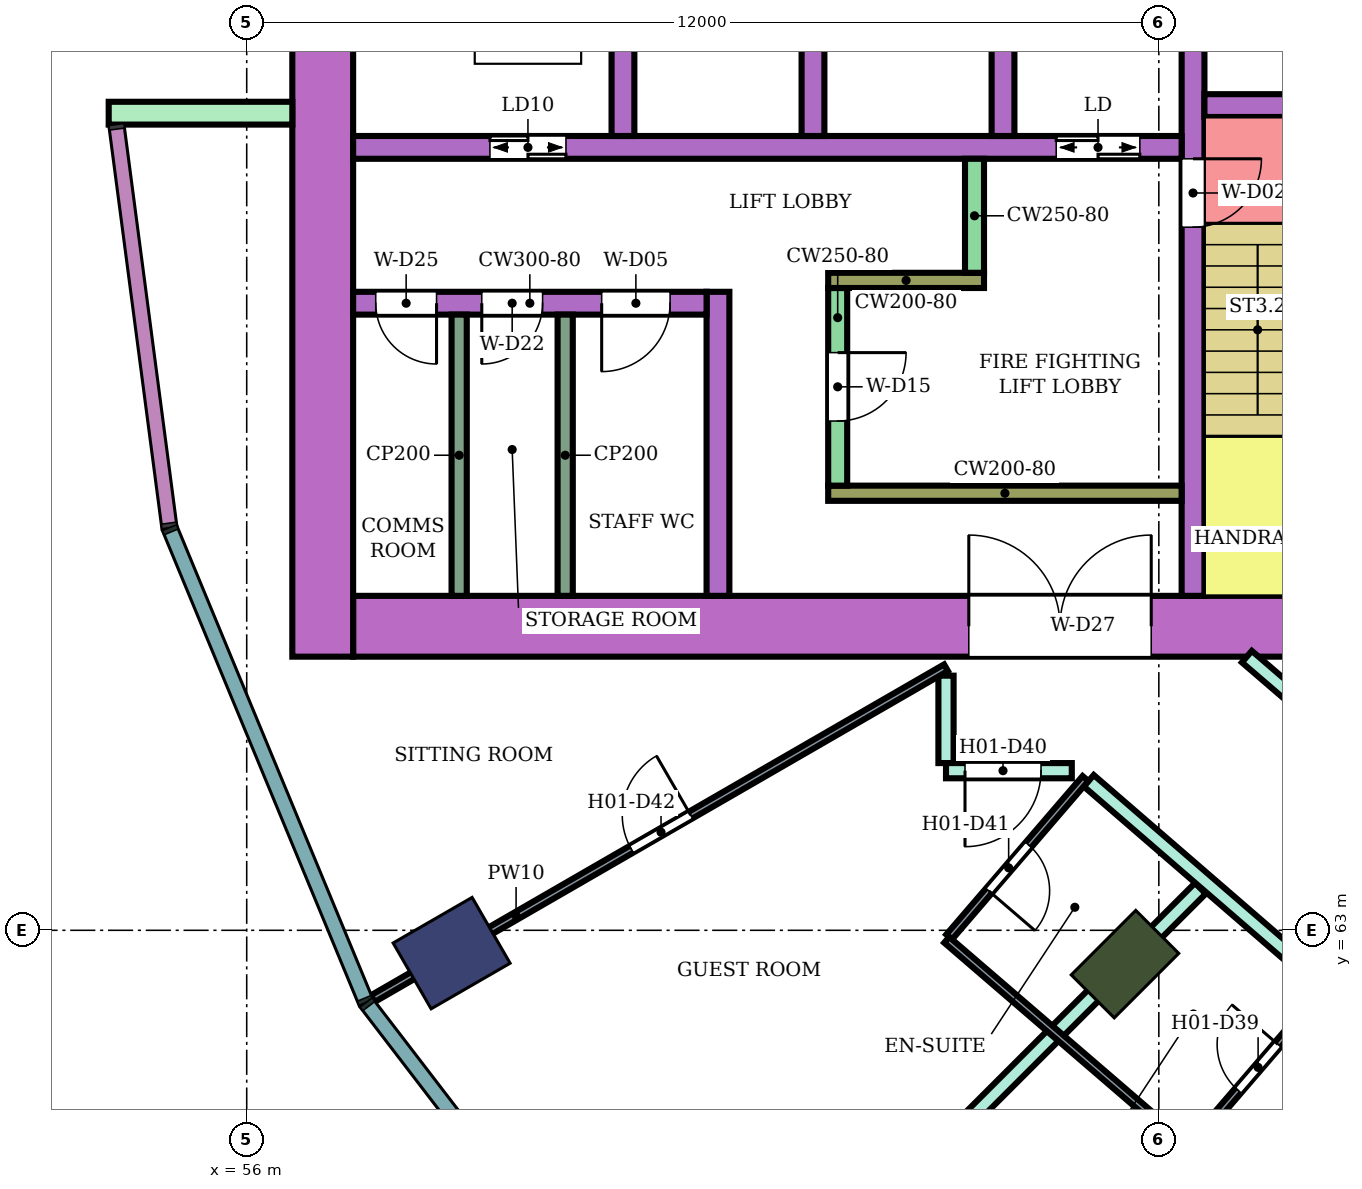
"""IFC4 building model, lengths in metres.
Left out: names, types, materials, properties, quantities, classifications, styles, units other than length and angle.
Written with IfcOpenShell. Run it as: python <this file> out.ifc"""

import sys

from ifc_helpers import new_model, si_unit, direction, frame, frame_2d, origin, origin_2d, place, context, subcontext, project, spatial, rectangle, extrude, element, fill, save


model = new_model("IFC4")
c1 = context("Model", 3, precision=1e-05, world=origin(), true_north=direction((0.0, 1.0)))
c2 = subcontext(c1, "Body", "Model", "MODEL_VIEW")
j1 = project(units=[si_unit("LENGTHUNIT", "METRE"), si_unit("PLANEANGLEUNIT", "RADIAN")], contexts=[c1])
p1 = place(None, origin())
s1 = spatial("IfcSite", under=j1, at=p1, CompositionType="ELEMENT")
p2 = place(p1, origin())
s2 = spatial("IfcBuilding", under=s1, at=p2, CompositionType="ELEMENT")
p3 = place(p2, frame((0.0, 0.0, 32.6)))
s3 = spatial("IfcBuildingStorey", under=s2, at=p3, CompositionType="ELEMENT", Elevation=32.6)
p4 = place(p3, frame((58.696, 62.7, 0.0), z_axis=(0.0, 0.0, 1.0), x_axis=(-0.866025403784, -0.5, 0.0)))
e1 = element("IfcColumn", 1, at=p4, inside=s3, PredefinedType="COLUMN", context=c2, shape_type="SweptSolid", body=[
    extrude(rectangle(XDim=1.2, YDim=1.0, at=origin_2d()), origin(), (0.0, 0.0, 1.0), 3.8),
])
p5 = place(p3, frame((67.555, 62.555, 0.0), z_axis=(0.0, 0.0, 1.0), x_axis=(-0.707106781187, -0.707106781187, 0.0)))
e2 = element("IfcColumn", 2, at=p5, inside=s3, PredefinedType="COLUMN", context=c2, shape_type="SweptSolid", body=[
    extrude(rectangle(XDim=1.2, YDim=0.8, at=origin_2d()), origin(), (0.0, 0.0, 1.0), 3.8),
])
p6 = place(p3, frame((72.1, 67.0, 0.0), z_axis=(0.0, 0.0, 1.0), x_axis=(-1.0, 0.0, 0.0)))
e3 = element("IfcWall", 3, at=p6, inside=s3, PredefinedType="SHEAR", context=c2, shape_type="SweptSolid", body=[
    extrude(rectangle(XDim=14.7, YDim=0.8, at=frame_2d((7.35, 0.0))), origin(), (0.0, 0.0, 1.0), 3.48),
])
p7 = place(p6, frame((4.2, 0.0, 0.0)))
e4 = element("IfcOpeningElement", 4, at=p7, cuts=e3, PredefinedType="OPENING", context=c2, shape_type="SweptSolid", body=[
    extrude(rectangle(XDim=2.4, YDim=2.4, at=frame_2d((1.2, 1.2))), frame((0.0, 0.41, 0.0), z_axis=(0.0, -1.0, 0.0), x_axis=(1.0, 0.0, 0.0)), (0.0, 0.0, 1.0), 0.82),
])
p8 = place(p3, frame((57.0, 83.4, 0.0), z_axis=(0.0, 0.0, 1.0), x_axis=(0.0, -1.0, 0.0)))
e5 = element("IfcWall", 5, at=p8, inside=s3, PredefinedType="SHEAR", context=c2, shape_type="SweptSolid", body=[
    extrude(rectangle(XDim=16.8, YDim=0.8, at=frame_2d((8.4, 0.0))), origin(), (0.0, 0.0, 1.0), 3.48),
])
p9 = place(p3, frame((68.45, 75.0, 0.0), z_axis=(0.0, 0.0, 1.0), x_axis=(0.0, -1.0, 0.0)))
e6 = element("IfcWall", 6, at=p9, inside=s3, PredefinedType="SHEAR", context=c2, shape_type="SweptSolid", body=[
    extrude(rectangle(XDim=7.6, YDim=0.3, at=frame_2d((3.8, 0.0))), origin(), (0.0, 0.0, 1.0), 3.48),
])
p10 = place(p9, frame((1.85, 0.0, 0.0)))
e7 = element("IfcOpeningElement", 7, at=p10, cuts=e6, PredefinedType="OPENING", context=c2, shape_type="SweptSolid", body=[
    extrude(rectangle(XDim=0.9, YDim=2.1, at=frame_2d((0.45, 1.05))), frame((0.0, 0.16, 0.0), z_axis=(0.0, -1.0, 0.0), x_axis=(1.0, 0.0, 0.0)), (0.0, 0.0, 1.0), 0.32),
])
p11 = place(p3, frame((71.65, 73.85, 0.0), z_axis=(0.0, 0.0, 1.0), x_axis=(-1.0, 0.0, 0.0)))
e8 = element("IfcWall", 8, at=p11, inside=s3, PredefinedType="SHEAR", context=c2, shape_type="SweptSolid", body=[
    extrude(rectangle(XDim=3.05, YDim=0.3, at=frame_2d((1.525, 0.0))), origin(), (0.0, 0.0, 1.0), 3.48),
])
p12 = place(p11, frame((1.1, 0.0, 0.0)))
e9 = element("IfcOpeningElement", 9, at=p12, cuts=e8, PredefinedType="OPENING", context=c2, shape_type="SweptSolid", body=[
    extrude(rectangle(XDim=0.7, YDim=2.0, at=frame_2d((0.35, 1.0))), frame((0.0, 0.16, 0.0), z_axis=(0.0, -1.0, 0.0), x_axis=(1.0, 0.0, 0.0)), (0.0, 0.0, 1.0), 0.32),
])
p13 = place(p3, frame((68.3, 73.3, 0.0), z_axis=(0.0, 0.0, 1.0), x_axis=(-1.0, 0.0, 0.0)))
e10 = element("IfcWall", 10, at=p13, inside=s3, PredefinedType="SHEAR", context=c2, shape_type="SweptSolid", body=[
    extrude(rectangle(XDim=10.9, YDim=0.3, at=frame_2d((5.45, 0.0))), origin(), (0.0, 0.0, 1.0), 3.48),
])
p14 = place(p13, frame((0.55, 0.0, 0.0)))
e11 = element("IfcOpeningElement", 11, at=p14, cuts=e10, PredefinedType="OPENING", context=c2, shape_type="SweptSolid", body=[
    extrude(rectangle(XDim=1.1, YDim=2.1, at=frame_2d((0.55, 1.05))), frame((0.0, 0.16, 0.0), z_axis=(0.0, -1.0, 0.0), x_axis=(1.0, 0.0, 0.0)), (0.0, 0.0, 1.0), 0.32),
])
p15 = place(p13, frame((8.1, 0.0, 0.0)))
e12 = element("IfcOpeningElement", 12, at=p15, cuts=e10, PredefinedType="OPENING", context=c2, shape_type="SweptSolid", body=[
    extrude(rectangle(XDim=1.0, YDim=2.1, at=frame_2d((0.5, 1.05))), frame((0.0, 0.16, 0.0), z_axis=(0.0, -1.0, 0.0), x_axis=(1.0, 0.0, 0.0)), (0.0, 0.0, 1.0), 0.32),
])
for number, where, z_axis, x_axis in (
    (13, (65.95, 76.0, 0.0), (0.0, 0.0, 1.0), (0.0, -1.0, 0.0)),
    (14, (63.45, 76.0, 0.0), (0.0, 0.0, 1.0), (0.0, -1.0, 0.0)),
    (15, (60.95, 76.0, 0.0), (0.0, 0.0, 1.0), (0.0, -1.0, 0.0)),
):
    element("IfcWall", number, at=place(p3, frame(where, z_axis=z_axis, x_axis=x_axis)), inside=s3, PredefinedType="SHEAR", context=c2, shape_type="SweptSolid", body=[
        extrude(rectangle(XDim=2.55, YDim=0.3, at=frame_2d((1.275, 0.0))), origin(), (0.0, 0.0, 1.0), 3.48),
    ])
p16 = place(p3, frame((68.3, 68.75, 0.0), z_axis=(0.0, 0.0, 1.0), x_axis=(-1.0, 0.0, 0.0)))
e16 = element("IfcWall", 16, at=p16, inside=s3, PredefinedType="SHEAR", context=c2, shape_type="SweptSolid", body=[
    extrude(rectangle(XDim=4.65, YDim=0.2, at=frame_2d((2.325, 0.0))), origin(), (0.0, 0.0, 1.0), 3.48),
])
p17 = place(p3, frame((63.775, 71.45, 0.0), z_axis=(0.0, 0.0, 1.0), x_axis=(0.0, -1.0, 0.0)))
e17 = element("IfcWall", 17, at=p17, inside=s3, PredefinedType="SHEAR", context=c2, shape_type="SweptSolid", body=[
    extrude(rectangle(XDim=2.6, YDim=0.25, at=frame_2d((1.3, 0.0))), origin(), (0.0, 0.0, 1.0), 3.48),
])
p18 = place(p17, frame((0.85, 0.0, 0.0)))
e18 = element("IfcOpeningElement", 18, at=p18, cuts=e17, PredefinedType="OPENING", context=c2, shape_type="SweptSolid", body=[
    extrude(rectangle(XDim=0.9, YDim=2.1, at=frame_2d((0.45, 1.05))), frame((0.0, 0.135, 0.0), z_axis=(0.0, -1.0, 0.0), x_axis=(1.0, 0.0, 0.0)), (0.0, 0.0, 1.0), 0.27),
])
p19 = place(p3, frame((65.7, 71.55, 0.0), z_axis=(0.0, 0.0, 1.0), x_axis=(-1.0, 0.0, 0.0)))
e19 = element("IfcWall", 19, at=p19, inside=s3, PredefinedType="SHEAR", context=c2, shape_type="SweptSolid", body=[
    extrude(rectangle(XDim=2.05, YDim=0.2, at=frame_2d((1.025, 0.0))), origin(), (0.0, 0.0, 1.0), 3.48),
])
p20 = place(p3, frame((65.575, 73.15, 0.0), z_axis=(0.0, 0.0, 1.0), x_axis=(0.0, -1.0, 0.0)))
e20 = element("IfcWall", 20, at=p20, inside=s3, PredefinedType="SHEAR", context=c2, shape_type="SweptSolid", body=[
    extrude(rectangle(XDim=1.5, YDim=0.25, at=frame_2d((0.75, 0.0))), origin(), (0.0, 0.0, 1.0), 3.48),
])
p21 = place(p3, frame((62.2, 71.4, 0.0), z_axis=(0.0, 0.0, 1.0), x_axis=(0.0, -1.0, 0.0)))
e21 = element("IfcWall", 21, at=p21, inside=s3, PredefinedType="SHEAR", context=c2, shape_type="SweptSolid", body=[
    extrude(rectangle(XDim=4.0, YDim=0.3, at=frame_2d((2.0, 0.0))), origin(), (0.0, 0.0, 1.0), 3.48),
])
p22 = place(p3, frame((62.05, 71.25, 0.0), z_axis=(0.0, 0.0, 1.0), x_axis=(-1.0, 0.0, 0.0)))
e22 = element("IfcWall", 22, at=p22, inside=s3, PredefinedType="SHEAR", context=c2, shape_type="SweptSolid", body=[
    extrude(rectangle(XDim=4.65, YDim=0.3, at=frame_2d((2.325, 0.0))), origin(), (0.0, 0.0, 1.0), 3.48),
])
p23 = place(p22, frame((0.48, 0.0, 0.0)))
e23 = element("IfcOpeningElement", 23, at=p23, cuts=e22, PredefinedType="OPENING", context=c2, shape_type="SweptSolid", body=[
    extrude(rectangle(XDim=0.9, YDim=2.1, at=frame_2d((0.45, 1.05))), frame((0.0, 0.16, 0.0), z_axis=(0.0, -1.0, 0.0), x_axis=(1.0, 0.0, 0.0)), (0.0, 0.0, 1.0), 0.32),
])
p24 = place(p22, frame((2.157, 0.0, 0.0)))
e24 = element("IfcOpeningElement", 24, at=p24, cuts=e22, PredefinedType="OPENING", context=c2, shape_type="SweptSolid", body=[
    extrude(rectangle(XDim=0.8, YDim=2.1, at=frame_2d((0.4, 1.05))), frame((0.0, 0.16, 0.0), z_axis=(0.0, -1.0, 0.0), x_axis=(1.0, 0.0, 0.0)), (0.0, 0.0, 1.0), 0.32),
])
p25 = place(p22, frame((3.552, 0.0, 0.0)))
e25 = element("IfcOpeningElement", 25, at=p25, cuts=e22, PredefinedType="OPENING", context=c2, shape_type="SweptSolid", body=[
    extrude(rectangle(XDim=0.8, YDim=2.1, at=frame_2d((0.4, 1.05))), frame((0.0, 0.16, 0.0), z_axis=(0.0, -1.0, 0.0), x_axis=(1.0, 0.0, 0.0)), (0.0, 0.0, 1.0), 0.32),
])
p26 = place(p3, frame((56.6, 73.75, 0.0), z_axis=(0.0, 0.0, 1.0), x_axis=(-1.0, 0.0, 0.0)))
e26 = element("IfcWall", 26, at=p26, inside=s3, PredefinedType="NOTDEFINED", context=c2, shape_type="SweptSolid", body=[
    extrude(rectangle(XDim=2.416, YDim=0.3, at=frame_2d((1.208, 0.0))), origin(), (0.0, 0.0, 1.0), 3.8),
])
p27 = place(p3, frame((63.592, 58.599, 0.0), z_axis=(0.0, 0.0, 1.0), x_axis=(0.707228748718, 0.706984792613, 0.0)))
e27 = element("IfcWall", 27, at=p27, inside=s3, PredefinedType="PARTITIONING", context=c2, shape_type="SweptSolid", body=[
    extrude(rectangle(XDim=7.005, YDim=0.2, at=frame_2d((3.503, 0.0))), origin(), (0.0, 0.0, 1.0), 3.35),
])
p28 = place(p3, frame((65.2, 65.2, 0.0), z_axis=(0.0, 0.0, 1.0), x_axis=(0.0, 1.0, 0.0)))
e28 = element("IfcWall", 28, at=p28, inside=s3, PredefinedType="PARTITIONING", context=c2, shape_type="SweptSolid", body=[
    extrude(rectangle(XDim=1.15, YDim=0.2, at=frame_2d((0.575, 0.0))), origin(), (0.0, 0.0, 1.0), 3.35),
])
p29 = place(p3, frame((65.2, 65.1, 0.0), z_axis=(0.0, 0.0, 1.0), x_axis=(1.0, 0.0, 0.0)))
e29 = element("IfcWall", 29, at=p29, inside=s3, PredefinedType="PARTITIONING", context=c2, shape_type="SweptSolid", body=[
    extrude(rectangle(XDim=1.655, YDim=0.2, at=frame_2d((0.828, 0.0))), origin(), (0.0, 0.0, 1.0), 3.35),
])
p30 = place(p29, frame((0.25, 0.0, 0.0)))
e30 = element("IfcOpeningElement", 30, at=p30, cuts=e29, PredefinedType="OPENING", context=c2, shape_type="SweptSolid", body=[
    extrude(rectangle(XDim=1.0, YDim=2.1, at=frame_2d((0.5, 1.05))), frame((0.0, 0.11, 0.0), z_axis=(0.0, -1.0, 0.0), x_axis=(1.0, 0.0, 0.0)), (0.0, 0.0, 1.0), 0.22),
])
p31 = place(p3, frame((67.078, 64.968, 0.0), z_axis=(0.0, 0.0, 1.0), x_axis=(0.756371089567, -0.654142778656, 0.0)))
e31 = element("IfcWall", 31, at=p31, inside=s3, PredefinedType="PARTITIONING", context=c2, shape_type="SweptSolid", body=[
    extrude(rectangle(XDim=6.185, YDim=0.2, at=frame_2d((3.093, 0.0))), origin(), (0.0, 0.0, 1.0), 3.35),
])
p32 = place(p31, frame((4.755, 0.0, 0.0)))
e32 = element("IfcOpeningElement", 32, at=p32, cuts=e31, PredefinedType="OPENING", context=c2, shape_type="SweptSolid", body=[
    extrude(rectangle(XDim=1.0, YDim=2.1, at=frame_2d((0.5, 1.05))), frame((0.0, 0.11, 0.0), z_axis=(0.0, -1.0, 0.0), x_axis=(1.0, 0.0, 0.0)), (0.0, 0.0, 1.0), 0.22),
])
p33 = place(p3, frame((67.096, 52.662, 0.0), z_axis=(0.0, 0.0, 1.0), x_axis=(0.500242450002, 0.865885379953, 0.0)))
e33 = element("IfcWall", 33, at=p33, inside=s3, PredefinedType="PARTITIONING", context=c2, shape_type="SweptSolid", body=[
    extrude(rectangle(XDim=9.374, YDim=0.2, at=frame_2d((4.687, 0.0))), origin(), (0.0, 0.0, 1.0), 3.35),
])
p34 = place(p3, frame((69.158, 66.6, 0.0), z_axis=(0.0, 0.0, 1.0), x_axis=(0.757976058094, -0.652282373943, 0.0)))
e34 = element("IfcWall", 34, at=p34, inside=s3, PredefinedType="PARTITIONING", context=c2, shape_type="SweptSolid", body=[
    extrude(rectangle(XDim=5.16, YDim=0.2, at=frame_2d((2.58, 0.0))), origin(), (0.0, 0.0, 1.0), 3.35),
])
p35 = place(p34, frame((1.6, 0.0, 0.0)))
e35 = element("IfcOpeningElement", 35, at=p35, cuts=e34, PredefinedType="OPENING", context=c2, shape_type="SweptSolid", body=[
    extrude(rectangle(XDim=1.0, YDim=2.1, at=frame_2d((0.5, 1.05))), frame((0.0, 0.11, 0.0), z_axis=(0.0, -1.0, 0.0), x_axis=(1.0, 0.0, 0.0)), (0.0, 0.0, 1.0), 0.22),
])
p36 = place(p3, frame((57.659, 62.101, 0.0), z_axis=(0.0, 0.0, 1.0), x_axis=(0.86602264145, 0.500004784474, 0.0)))
e36 = element("IfcWall", 36, at=p36, inside=s3, PredefinedType="PARTITIONING", context=c2, shape_type="SweptSolid", body=[
    extrude(rectangle(XDim=8.708, YDim=0.1, at=frame_2d((4.354, 0.0))), origin(), (0.0, 0.0, 1.0), 3.35),
])
p37 = place(p36, frame((3.929, 0.0, 0.0)))
e37 = element("IfcOpeningElement", 37, at=p37, cuts=e36, PredefinedType="OPENING", context=c2, shape_type="SweptSolid", body=[
    extrude(rectangle(XDim=0.9, YDim=2.1, at=frame_2d((0.45, 1.05))), frame((0.0, 0.06, 0.0), z_axis=(0.0, -1.0, 0.0), x_axis=(1.0, 0.0, 0.0)), (0.0, 0.0, 1.0), 0.12),
])
p38 = place(p3, frame((65.242, 62.912, 0.0), z_axis=(0.0, 0.0, 1.0), x_axis=(0.652069888227, 0.758158862553, 0.0)))
e38 = element("IfcWall", 38, at=p38, inside=s3, PredefinedType="PARTITIONING", context=c2, shape_type="SweptSolid", body=[
    extrude(rectangle(XDim=2.75, YDim=0.1, at=frame_2d((1.375, 0.0))), origin(), (0.0, 0.0, 1.0), 3.35),
])
p39 = place(p38, frame((0.8, 0.0, 0.0)))
e39 = element("IfcOpeningElement", 39, at=p39, cuts=e38, PredefinedType="OPENING", context=c2, shape_type="SweptSolid", body=[
    extrude(rectangle(XDim=0.8, YDim=2.1, at=frame_2d((0.4, 1.05))), frame((0.0, 0.06, 0.0), z_axis=(0.0, -1.0, 0.0), x_axis=(1.0, 0.0, 0.0)), (0.0, 0.0, 1.0), 0.12),
])
p40 = place(p3, frame((65.209, 62.875, 0.0), z_axis=(0.0, 0.0, 1.0), x_axis=(0.757930378138, -0.652335451969, 0.0)))
e40 = element("IfcWall", 40, at=p40, inside=s3, PredefinedType="PARTITIONING", context=c2, shape_type="SweptSolid", body=[
    extrude(rectangle(XDim=4.15, YDim=0.1, at=frame_2d((2.075, 0.0))), origin(), (0.0, 0.0, 1.0), 3.35),
])
p41 = place(p3, frame((68.393, 60.135, 0.0), z_axis=(0.0, 0.0, 1.0), x_axis=(0.652061182569, 0.758166349944, 0.0)))
e41 = element("IfcWall", 41, at=p41, inside=s3, PredefinedType="PARTITIONING", context=c2, shape_type="SweptSolid", body=[
    extrude(rectangle(XDim=2.69, YDim=0.1, at=frame_2d((1.345, 0.0))), origin(), (0.0, 0.0, 1.0), 3.35),
])
p42 = place(p41, frame((1.0, 0.0, 0.0)))
e42 = element("IfcOpeningElement", 42, at=p42, cuts=e41, PredefinedType="OPENING", context=c2, shape_type="SweptSolid", body=[
    extrude(rectangle(XDim=0.8, YDim=2.1, at=frame_2d((0.4, 1.05))), frame((0.0, 0.06, 0.0), z_axis=(0.0, -1.0, 0.0), x_axis=(1.0, 0.0, 0.0)), (0.0, 0.0, 1.0), 0.12),
])
for number, where, z_axis, x_axis in (
    (43, (60.19, 71.1, 0.0), (0.0, 0.0, 1.0), (0.0, -1.0, 0.0)),
    (44, (58.795, 71.1, 0.0), (0.0, 0.0, 1.0), (0.0, -1.0, 0.0)),
):
    element("IfcWall", number, at=place(p3, frame(where, z_axis=z_axis, x_axis=x_axis)), inside=s3, PredefinedType="PARTITIONING", context=c2, shape_type="SweptSolid", body=[
        extrude(rectangle(XDim=3.7, YDim=0.2, at=frame_2d((1.85, 0.0))), origin(), (0.0, 0.0, 1.0), 3.48),
    ])
p43 = place(p42, origin())
e45 = element("IfcDoor", 45, at=p43, inside=s3, OperationType="SINGLE_SWING_RIGHT", PredefinedType="DOOR", context=c2, shape_type="SweptSolid", body=[
    extrude(rectangle(XDim=0.8, YDim=2.1, at=frame_2d((0.4, 1.05))), frame((0.0, 0.025, 0.0), z_axis=(0.0, -1.0, 0.0), x_axis=(1.0, 0.0, 0.0)), (0.0, 0.0, 1.0), 0.05),
])
fill(e42, e45)
p44 = place(p30, frame((1.0, 0.0, 0.0), z_axis=(0.0, 0.0, 1.0), x_axis=(-1.0, 0.0, 0.0)))
e46 = element("IfcDoor", 46, at=p44, inside=s3, OperationType="SINGLE_SWING_RIGHT", PredefinedType="DOOR", context=c2, shape_type="SweptSolid", body=[
    extrude(rectangle(XDim=1.0, YDim=2.1, at=frame_2d((0.5, 1.05))), frame((0.0, 0.025, 0.0), z_axis=(0.0, -1.0, 0.0), x_axis=(1.0, 0.0, 0.0)), (0.0, 0.0, 1.0), 0.05),
])
fill(e30, e46)
p45 = place(p39, frame((0.8, 0.0, 0.0), z_axis=(0.0, 0.0, 1.0), x_axis=(-1.0, 0.0, 0.0)))
e47 = element("IfcDoor", 47, at=p45, inside=s3, OperationType="SINGLE_SWING_RIGHT", PredefinedType="DOOR", context=c2, shape_type="SweptSolid", body=[
    extrude(rectangle(XDim=0.8, YDim=2.1, at=frame_2d((0.4, 1.05))), frame((0.0, 0.025, 0.0), z_axis=(0.0, -1.0, 0.0), x_axis=(1.0, 0.0, 0.0)), (0.0, 0.0, 1.0), 0.05),
])
fill(e39, e47)
p46 = place(p37, origin())
e48 = element("IfcDoor", 48, at=p46, inside=s3, OperationType="SINGLE_SWING_RIGHT", PredefinedType="DOOR", context=c2, shape_type="SweptSolid", body=[
    extrude(rectangle(XDim=0.9, YDim=2.1, at=frame_2d((0.45, 1.05))), frame((0.0, 0.025, 0.0), z_axis=(0.0, -1.0, 0.0), x_axis=(1.0, 0.0, 0.0)), (0.0, 0.0, 1.0), 0.05),
])
fill(e37, e48)
p47 = place(p10, origin())
e49 = element("IfcDoor", 49, at=p47, inside=s3, OperationType="SINGLE_SWING_LEFT", PredefinedType="DOOR", context=c2, shape_type="SweptSolid", body=[
    extrude(rectangle(XDim=0.9, YDim=2.1, at=frame_2d((0.45, 1.05))), frame((0.0, 0.025, 0.0), z_axis=(0.0, -1.0, 0.0), x_axis=(1.0, 0.0, 0.0)), (0.0, 0.0, 1.0), 0.05),
])
fill(e7, e49)
p48 = place(p14, origin())
e50 = element("IfcDoor", 50, at=p48, inside=s3, OperationType="DOUBLE_DOOR_SLIDING", PredefinedType="DOOR", context=c2, shape_type="SweptSolid", body=[
    extrude(rectangle(XDim=1.1, YDim=2.1, at=frame_2d((0.55, 1.05))), frame((0.0, 0.025, 0.0), z_axis=(0.0, -1.0, 0.0), x_axis=(1.0, 0.0, 0.0)), (0.0, 0.0, 1.0), 0.05),
])
fill(e11, e50)
p49 = place(p15, origin())
e51 = element("IfcDoor", 51, at=p49, inside=s3, OperationType="DOUBLE_DOOR_SLIDING", PredefinedType="DOOR", context=c2, shape_type="SweptSolid", body=[
    extrude(rectangle(XDim=1.0, YDim=2.1, at=frame_2d((0.5, 1.05))), frame((0.0, 0.025, 0.0), z_axis=(0.0, -1.0, 0.0), x_axis=(1.0, 0.0, 0.0)), (0.0, 0.0, 1.0), 0.05),
])
fill(e12, e51)
p50 = place(p18, origin())
e52 = element("IfcDoor", 52, at=p50, inside=s3, OperationType="SINGLE_SWING_LEFT", PredefinedType="DOOR", context=c2, shape_type="SweptSolid", body=[
    extrude(rectangle(XDim=0.9, YDim=2.1, at=frame_2d((0.45, 1.05))), frame((0.0, 0.025, 0.0), z_axis=(0.0, -1.0, 0.0), x_axis=(1.0, 0.0, 0.0)), (0.0, 0.0, 1.0), 0.05),
])
fill(e18, e52)
p51 = place(p23, origin())
e53 = element("IfcDoor", 53, at=p51, inside=s3, OperationType="SINGLE_SWING_RIGHT", PredefinedType="DOOR", context=c2, shape_type="SweptSolid", body=[
    extrude(rectangle(XDim=0.9, YDim=2.1, at=frame_2d((0.45, 1.05))), frame((0.0, 0.025, 0.0), z_axis=(0.0, -1.0, 0.0), x_axis=(1.0, 0.0, 0.0)), (0.0, 0.0, 1.0), 0.05),
])
fill(e23, e53)
p52 = place(p24, origin())
e54 = element("IfcDoor", 54, at=p52, inside=s3, OperationType="SINGLE_SWING_RIGHT", PredefinedType="DOOR", context=c2, shape_type="SweptSolid", body=[
    extrude(rectangle(XDim=0.8, YDim=2.1, at=frame_2d((0.4, 1.05))), frame((0.0, 0.025, 0.0), z_axis=(0.0, -1.0, 0.0), x_axis=(1.0, 0.0, 0.0)), (0.0, 0.0, 1.0), 0.05),
])
fill(e24, e54)
p53 = place(p25, origin())
e55 = element("IfcDoor", 55, at=p53, inside=s3, OperationType="SINGLE_SWING_LEFT", PredefinedType="DOOR", context=c2, shape_type="SweptSolid", body=[
    extrude(rectangle(XDim=0.8, YDim=2.1, at=frame_2d((0.4, 1.05))), frame((0.0, 0.025, 0.0), z_axis=(0.0, -1.0, 0.0), x_axis=(1.0, 0.0, 0.0)), (0.0, 0.0, 1.0), 0.05),
])
fill(e25, e55)
p54 = place(p7, frame((2.4, 0.0, 0.0), z_axis=(0.0, 0.0, 1.0), x_axis=(-1.0, 0.0, 0.0)))
e56 = element("IfcDoor", 56, at=p54, inside=s3, OperationType="DOUBLE_DOOR_SINGLE_SWING", PredefinedType="DOOR", context=c2, shape_type="SweptSolid", body=[
    extrude(rectangle(XDim=2.4, YDim=2.4, at=frame_2d((1.2, 1.2))), frame((0.0, 0.025, 0.0), z_axis=(0.0, -1.0, 0.0), x_axis=(1.0, 0.0, 0.0)), (0.0, 0.0, 1.0), 0.05),
])
fill(e4, e56)
save(model, sys.argv[1])
